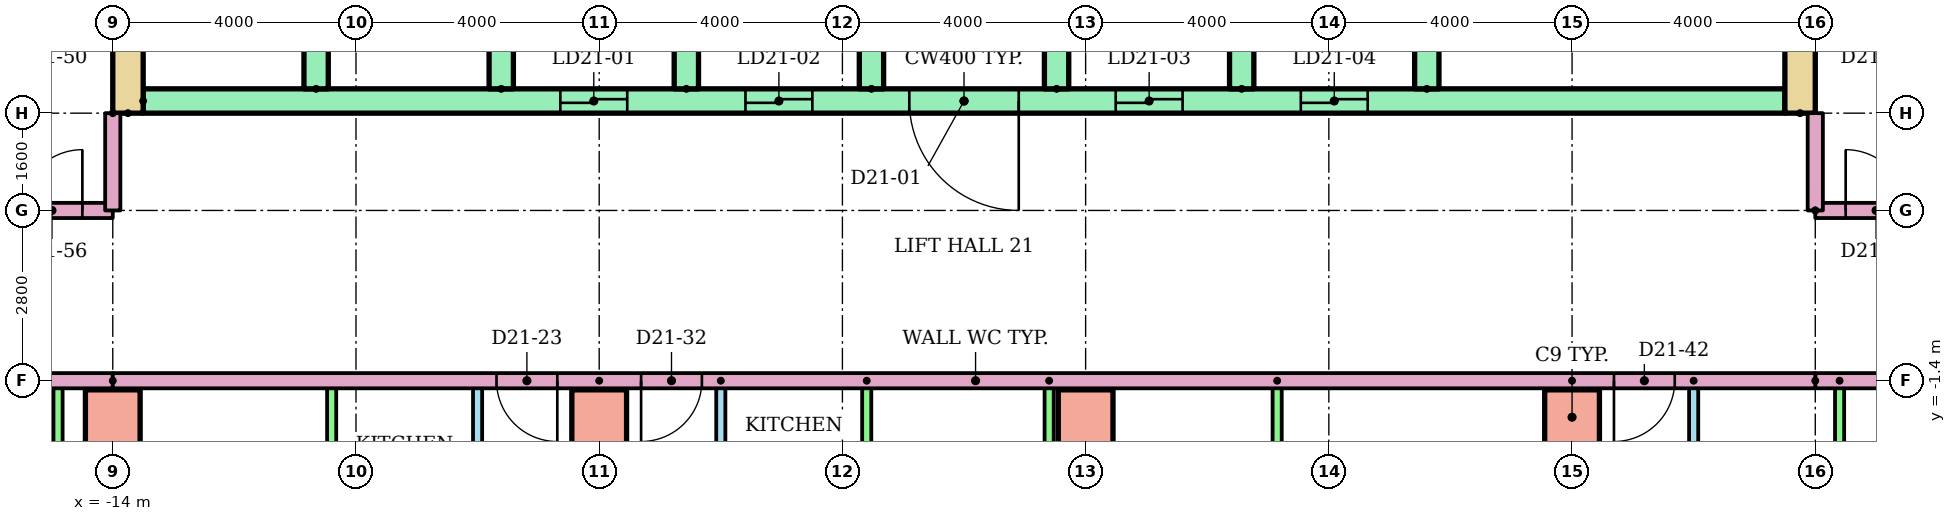
"""IFC4 building model, lengths in metres.
Left out: names, types, materials, properties, quantities, classifications, styles, units other than length and angle.
Written with IfcOpenShell. Run it as: python <this file> out.ifc"""

import sys

from ifc_helpers import new_model, si_unit, direction, frame, frame_2d, origin, origin_2d, place, context, subcontext, project, spatial, rectangle, extrude, element, fill, save


model = new_model("IFC4")
c1 = context("Model", 3, precision=1e-05, world=origin(), true_north=direction((0.0, 1.0)))
c2 = subcontext(c1, "Body", "Model", "MODEL_VIEW")
j1 = project(units=[si_unit("LENGTHUNIT", "METRE"), si_unit("PLANEANGLEUNIT", "RADIAN")], contexts=[c1])
p1 = place(None, origin())
s1 = spatial("IfcSite", under=j1, at=p1, CompositionType="ELEMENT")
p2 = place(p1, origin())
s2 = spatial("IfcBuilding", under=s1, at=p2, CompositionType="ELEMENT")
p3 = place(p2, frame((0.0, 0.0, 83.9)))
s3 = spatial("IfcBuildingStorey", under=s2, at=p3, CompositionType="ELEMENT", Elevation=83.9)
for number, where in (
    (1, (-14.0, -2.0, 0.0)),
    (2, (-6.0, -2.0, 0.0)),
    (3, (2.0, -2.0, 0.0)),
    (4, (10.0, -2.0, 0.0)),
):
    element("IfcColumn", number, at=place(p3, frame(where)), inside=s3, PredefinedType="COLUMN", context=c2, shape_type="SweptSolid", body=[
        extrude(rectangle(XDim=0.9, YDim=0.9, at=origin_2d()), origin(), (0.0, 0.0, 1.0), 3.2),
    ])
for number, where, z_axis, x_axis in (
    (5, (-13.75, 3.0, 0.0), (0.0, 0.0, 1.0), (0.0, 1.0, 0.0)),
    (6, (13.75, 3.0, 0.0), (0.0, 0.0, 1.0), (0.0, 1.0, 0.0)),
):
    element("IfcWall", number, at=place(p3, frame(where, z_axis=z_axis, x_axis=x_axis)), inside=s3, PredefinedType="SHEAR", context=c2, shape_type="SweptSolid", body=[
        extrude(rectangle(XDim=17.0, YDim=0.5, at=frame_2d((8.5, 0.0))), origin(), (0.0, 0.0, 1.0), 2.92),
    ])
p4 = place(p3, frame((-13.5, 3.2, 0.0)))
e7 = element("IfcWall", 7, at=p4, inside=s3, PredefinedType="SHEAR", context=c2, shape_type="SweptSolid", body=[
    extrude(rectangle(XDim=27.0, YDim=0.4, at=frame_2d((13.5, 0.0))), origin(), (0.0, 0.0, 1.0), 2.92),
])
p5 = place(p4, frame((6.861, 0.0, 0.0)))
e8 = element("IfcOpeningElement", 8, at=p5, cuts=e7, PredefinedType="OPENING", context=c2, shape_type="SweptSolid", body=[
    extrude(rectangle(XDim=1.1, YDim=2.1, at=frame_2d((0.55, 1.05))), frame((0.0, 0.21, 0.0), z_axis=(0.0, -1.0, 0.0), x_axis=(1.0, 0.0, 0.0)), (0.0, 0.0, 1.0), 0.42),
])
p6 = place(p4, frame((9.906, 0.0, 0.0)))
e9 = element("IfcOpeningElement", 9, at=p6, cuts=e7, PredefinedType="OPENING", context=c2, shape_type="SweptSolid", body=[
    extrude(rectangle(XDim=1.1, YDim=2.1, at=frame_2d((0.55, 1.05))), frame((0.0, 0.21, 0.0), z_axis=(0.0, -1.0, 0.0), x_axis=(1.0, 0.0, 0.0)), (0.0, 0.0, 1.0), 0.42),
])
p7 = place(p4, frame((15.994, 0.0, 0.0)))
e10 = element("IfcOpeningElement", 10, at=p7, cuts=e7, PredefinedType="OPENING", context=c2, shape_type="SweptSolid", body=[
    extrude(rectangle(XDim=1.1, YDim=2.1, at=frame_2d((0.55, 1.05))), frame((0.0, 0.21, 0.0), z_axis=(0.0, -1.0, 0.0), x_axis=(1.0, 0.0, 0.0)), (0.0, 0.0, 1.0), 0.42),
])
p8 = place(p4, frame((19.039, 0.0, 0.0)))
e11 = element("IfcOpeningElement", 11, at=p8, cuts=e7, PredefinedType="OPENING", context=c2, shape_type="SweptSolid", body=[
    extrude(rectangle(XDim=1.1, YDim=2.1, at=frame_2d((0.55, 1.05))), frame((0.0, 0.21, 0.0), z_axis=(0.0, -1.0, 0.0), x_axis=(1.0, 0.0, 0.0)), (0.0, 0.0, 1.0), 0.42),
])
p9 = place(p4, frame((12.6, 0.0, 0.0)))
e12 = element("IfcOpeningElement", 12, at=p9, cuts=e7, PredefinedType="OPENING", context=c2, shape_type="SweptSolid", body=[
    extrude(rectangle(XDim=1.8, YDim=2.1, at=frame_2d((0.9, 1.05))), frame((0.0, 0.21, 0.0), z_axis=(0.0, -1.0, 0.0), x_axis=(1.0, 0.0, 0.0)), (0.0, 0.0, 1.0), 0.42),
])
for number, where, z_axis, x_axis in (
    (13, (-10.656, 3.4, 0.0), (0.0, 0.0, 1.0), (0.0, 1.0, 0.0)),
    (14, (-7.611, 3.4, 0.0), (0.0, 0.0, 1.0), (0.0, 1.0, 0.0)),
    (15, (-4.567, 3.4, 0.0), (0.0, 0.0, 1.0), (0.0, 1.0, 0.0)),
    (16, (-1.522, 3.4, 0.0), (0.0, 0.0, 1.0), (0.0, 1.0, 0.0)),
    (17, (1.522, 3.4, 0.0), (0.0, 0.0, 1.0), (0.0, 1.0, 0.0)),
    (18, (4.567, 3.4, 0.0), (0.0, 0.0, 1.0), (0.0, 1.0, 0.0)),
    (19, (7.611, 3.4, 0.0), (0.0, 0.0, 1.0), (0.0, 1.0, 0.0)),
):
    element("IfcWall", number, at=place(p3, frame(where, z_axis=z_axis, x_axis=x_axis)), inside=s3, PredefinedType="SHEAR", context=c2, shape_type="SweptSolid", body=[
        extrude(rectangle(XDim=3.0, YDim=0.4, at=frame_2d((1.5, 0.0))), origin(), (0.0, 0.0, 1.0), 2.92),
    ])
p10 = place(p3, frame((-8.0, -7.9, 0.0), z_axis=(0.0, 0.0, 1.0), x_axis=(0.0, 1.0, 0.0)))
e20 = element("IfcWall", 20, at=p10, inside=s3, PredefinedType="PARTITIONING", context=c2, shape_type="SweptSolid", body=[
    extrude(rectangle(XDim=6.5, YDim=0.15, at=frame_2d((3.25, 0.0))), origin(), (0.0, 0.0, 1.0), 2.4),
])
p11 = place(p10, frame((4.3, 0.0, 0.0)))
e21 = element("IfcOpeningElement", 21, at=p11, cuts=e20, PredefinedType="OPENING", context=c2, shape_type="SweptSolid", body=[
    extrude(rectangle(XDim=0.9, YDim=2.1, at=frame_2d((0.45, 1.05))), frame((0.0, 0.085, 0.0), z_axis=(0.0, -1.0, 0.0), x_axis=(1.0, 0.0, 0.0)), (0.0, 0.0, 1.0), 0.17),
])
p12 = place(p10, frame((1.1, 0.0, 0.0)))
e22 = element("IfcOpeningElement", 22, at=p12, cuts=e20, PredefinedType="OPENING", context=c2, shape_type="SweptSolid", body=[
    extrude(rectangle(XDim=0.8, YDim=2.1, at=frame_2d((0.4, 1.05))), frame((0.0, 0.085, 0.0), z_axis=(0.0, -1.0, 0.0), x_axis=(1.0, 0.0, 0.0)), (0.0, 0.0, 1.0), 0.17),
])
for number, where, z_axis, x_axis in (
    (23, (-10.4, -7.9, 0.0), (0.0, 0.0, 1.0), (0.0, 1.0, 0.0)),
    (24, (-14.9, -7.9, 0.0), (0.0, 0.0, 1.0), (0.0, 1.0, 0.0)),
):
    element("IfcWall", number, at=place(p3, frame(where, z_axis=z_axis, x_axis=x_axis)), inside=s3, PredefinedType="PARTITIONING", context=c2, shape_type="SweptSolid", body=[
        extrude(rectangle(XDim=6.5, YDim=0.15, at=frame_2d((3.25, 0.0))), origin(), (0.0, 0.0, 1.0), 2.4),
    ])
p13 = place(p3, frame((-4.0, -1.4, 0.0), z_axis=(0.0, 0.0, 1.0), x_axis=(0.0, -1.0, 0.0)))
e25 = element("IfcWall", 25, at=p13, inside=s3, PredefinedType="PARTITIONING", context=c2, shape_type="SweptSolid", body=[
    extrude(rectangle(XDim=6.5, YDim=0.15, at=frame_2d((3.25, 0.0))), origin(), (0.0, 0.0, 1.0), 2.4),
])
p14 = place(p13, frame((1.3, 0.0, 0.0)))
e26 = element("IfcOpeningElement", 26, at=p14, cuts=e25, PredefinedType="OPENING", context=c2, shape_type="SweptSolid", body=[
    extrude(rectangle(XDim=0.9, YDim=2.1, at=frame_2d((0.45, 1.05))), frame((0.0, 0.085, 0.0), z_axis=(0.0, -1.0, 0.0), x_axis=(1.0, 0.0, 0.0)), (0.0, 0.0, 1.0), 0.17),
])
p15 = place(p13, frame((4.6, 0.0, 0.0)))
e27 = element("IfcOpeningElement", 27, at=p15, cuts=e25, PredefinedType="OPENING", context=c2, shape_type="SweptSolid", body=[
    extrude(rectangle(XDim=0.8, YDim=2.1, at=frame_2d((0.4, 1.05))), frame((0.0, 0.085, 0.0), z_axis=(0.0, -1.0, 0.0), x_axis=(1.0, 0.0, 0.0)), (0.0, 0.0, 1.0), 0.17),
])
for number, where, z_axis, x_axis in (
    (28, (-1.6, -1.4, 0.0), (0.0, 0.0, 1.0), (0.0, -1.0, 0.0)),
    (29, (1.4, -1.4, 0.0), (0.0, 0.0, 1.0), (0.0, -1.0, 0.0)),
    (30, (5.15, -1.4, 0.0), (0.0, 0.0, 1.0), (0.0, -1.0, 0.0)),
):
    element("IfcWall", number, at=place(p3, frame(where, z_axis=z_axis, x_axis=x_axis)), inside=s3, PredefinedType="PARTITIONING", context=c2, shape_type="SweptSolid", body=[
        extrude(rectangle(XDim=6.5, YDim=0.15, at=frame_2d((3.25, 0.0))), origin(), (0.0, 0.0, 1.0), 2.4),
    ])
p16 = place(p3, frame((-6.0, -1.4, 0.0), z_axis=(0.0, 0.0, 1.0), x_axis=(0.0, -1.0, 0.0)))
e31 = element("IfcWall", 31, at=p16, inside=s3, PredefinedType="PARTITIONING", context=c2, shape_type="SweptSolid", body=[
    extrude(rectangle(XDim=14.81, YDim=0.25, at=frame_2d((7.405, 0.0))), origin(), (0.0, 0.0, 1.0), 2.4),
])
p17 = place(p3, frame((12.0, -1.4, 0.0), z_axis=(0.0, 0.0, 1.0), x_axis=(0.0, -1.0, 0.0)))
e32 = element("IfcWall", 32, at=p17, inside=s3, PredefinedType="PARTITIONING", context=c2, shape_type="SweptSolid", body=[
    extrude(rectangle(XDim=6.5, YDim=0.15, at=frame_2d((3.25, 0.0))), origin(), (0.0, 0.0, 1.0), 2.4),
])
p18 = place(p17, frame((1.3, 0.0, 0.0)))
e33 = element("IfcOpeningElement", 33, at=p18, cuts=e32, PredefinedType="OPENING", context=c2, shape_type="SweptSolid", body=[
    extrude(rectangle(XDim=0.9, YDim=2.1, at=frame_2d((0.45, 1.05))), frame((0.0, 0.085, 0.0), z_axis=(0.0, -1.0, 0.0), x_axis=(1.0, 0.0, 0.0)), (0.0, 0.0, 1.0), 0.17),
])
p19 = place(p17, frame((4.6, 0.0, 0.0)))
e34 = element("IfcOpeningElement", 34, at=p19, cuts=e32, PredefinedType="OPENING", context=c2, shape_type="SweptSolid", body=[
    extrude(rectangle(XDim=0.8, YDim=2.1, at=frame_2d((0.4, 1.05))), frame((0.0, 0.085, 0.0), z_axis=(0.0, -1.0, 0.0), x_axis=(1.0, 0.0, 0.0)), (0.0, 0.0, 1.0), 0.17),
])
p20 = place(p3, frame((14.4, -1.4, 0.0), z_axis=(0.0, 0.0, 1.0), x_axis=(0.0, -1.0, 0.0)))
e35 = element("IfcWall", 35, at=p20, inside=s3, PredefinedType="PARTITIONING", context=c2, shape_type="SweptSolid", body=[
    extrude(rectangle(XDim=6.5, YDim=0.15, at=frame_2d((3.25, 0.0))), origin(), (0.0, 0.0, 1.0), 2.4),
])
p21 = place(p3, frame((10.0, -1.4, 0.0), z_axis=(0.0, 0.0, 1.0), x_axis=(0.0, -1.0, 0.0)))
e36 = element("IfcWall", 36, at=p21, inside=s3, PredefinedType="PARTITIONING", context=c2, shape_type="SweptSolid", body=[
    extrude(rectangle(XDim=14.81, YDim=0.25, at=frame_2d((7.405, 0.0))), origin(), (0.0, 0.0, 1.0), 2.4),
])
p22 = place(p3, frame((-14.0, -1.4, 0.0), z_axis=(0.0, 0.0, 1.0), x_axis=(-1.0, 0.0, 0.0)))
e37 = element("IfcWall", 37, at=p22, inside=s3, PredefinedType="PARTITIONING", context=c2, shape_type="SweptSolid", body=[
    extrude(rectangle(XDim=14.62, YDim=0.25, at=frame_2d((7.31, 0.0))), origin(), (0.0, 0.0, 1.0), 2.4),
])
p23 = place(p3, frame((29.0, -1.4, 0.0), z_axis=(0.0, 0.0, 1.0), x_axis=(-1.0, 0.0, 0.0)))
e38 = element("IfcWall", 38, at=p23, inside=s3, PredefinedType="PARTITIONING", context=c2, shape_type="SweptSolid", body=[
    extrude(rectangle(XDim=15.0, YDim=0.25, at=frame_2d((7.5, 0.0))), origin(), (0.0, 0.0, 1.0), 2.4),
])
p24 = place(p23, frame((1.311, 0.0, 0.0)))
e39 = element("IfcOpeningElement", 39, at=p24, cuts=e38, PredefinedType="OPENING", context=c2, shape_type="SweptSolid", body=[
    extrude(rectangle(XDim=1.0, YDim=2.1, at=frame_2d((0.5, 1.05))), frame((0.0, 0.135, 0.0), z_axis=(0.0, -1.0, 0.0), x_axis=(1.0, 0.0, 0.0)), (0.0, 0.0, 1.0), 0.27),
])
p25 = place(p3, frame((-28.62, 1.4, 0.0)))
e40 = element("IfcWall", 40, at=p25, inside=s3, PredefinedType="PARTITIONING", context=c2, shape_type="SweptSolid", body=[
    extrude(rectangle(XDim=14.62, YDim=0.25, at=frame_2d((7.31, 0.0))), origin(), (0.0, 0.0, 1.0), 2.4),
])
p26 = place(p25, frame((13.12, 0.0, 0.0)))
e41 = element("IfcOpeningElement", 41, at=p26, cuts=e40, PredefinedType="OPENING", context=c2, shape_type="SweptSolid", body=[
    extrude(rectangle(XDim=1.0, YDim=2.1, at=frame_2d((0.5, 1.05))), frame((0.0, 0.135, 0.0), z_axis=(0.0, -1.0, 0.0), x_axis=(1.0, 0.0, 0.0)), (0.0, 0.0, 1.0), 0.27),
])
p27 = place(p3, frame((14.0, 1.4, 0.0)))
e42 = element("IfcWall", 42, at=p27, inside=s3, PredefinedType="PARTITIONING", context=c2, shape_type="SweptSolid", body=[
    extrude(rectangle(XDim=15.0, YDim=0.25, at=frame_2d((7.5, 0.0))), origin(), (0.0, 0.0, 1.0), 2.4),
])
p28 = place(p27, frame((0.5, 0.0, 0.0)))
e43 = element("IfcOpeningElement", 43, at=p28, cuts=e42, PredefinedType="OPENING", context=c2, shape_type="SweptSolid", body=[
    extrude(rectangle(XDim=1.0, YDim=2.1, at=frame_2d((0.5, 1.05))), frame((0.0, 0.135, 0.0), z_axis=(0.0, -1.0, 0.0), x_axis=(1.0, 0.0, 0.0)), (0.0, 0.0, 1.0), 0.27),
])
p29 = place(p27, frame((12.689, 0.0, 0.0)))
e44 = element("IfcOpeningElement", 44, at=p29, cuts=e42, PredefinedType="OPENING", context=c2, shape_type="SweptSolid", body=[
    extrude(rectangle(XDim=1.0, YDim=2.1, at=frame_2d((0.5, 1.05))), frame((0.0, 0.135, 0.0), z_axis=(0.0, -1.0, 0.0), x_axis=(1.0, 0.0, 0.0)), (0.0, 0.0, 1.0), 0.27),
])
p30 = place(p3, frame((14.0, -1.4, 0.0), z_axis=(0.0, 0.0, 1.0), x_axis=(-1.0, 0.0, 0.0)))
e45 = element("IfcWall", 45, at=p30, inside=s3, PredefinedType="PARTITIONING", context=c2, shape_type="SweptSolid", body=[
    extrude(rectangle(XDim=28.0, YDim=0.25, at=frame_2d((14.0, 0.0))), origin(), (0.0, 0.0, 1.0), 2.4),
])
p31 = place(p30, frame((20.689, 0.0, 0.0)))
e46 = element("IfcOpeningElement", 46, at=p31, cuts=e45, PredefinedType="OPENING", context=c2, shape_type="SweptSolid", body=[
    extrude(rectangle(XDim=1.0, YDim=2.1, at=frame_2d((0.5, 1.05))), frame((0.0, 0.135, 0.0), z_axis=(0.0, -1.0, 0.0), x_axis=(1.0, 0.0, 0.0)), (0.0, 0.0, 1.0), 0.27),
])
p32 = place(p30, frame((18.311, 0.0, 0.0)))
e47 = element("IfcOpeningElement", 47, at=p32, cuts=e45, PredefinedType="OPENING", context=c2, shape_type="SweptSolid", body=[
    extrude(rectangle(XDim=1.0, YDim=2.1, at=frame_2d((0.5, 1.05))), frame((0.0, 0.135, 0.0), z_axis=(0.0, -1.0, 0.0), x_axis=(1.0, 0.0, 0.0)), (0.0, 0.0, 1.0), 0.27),
])
p33 = place(p30, frame((2.311, 0.0, 0.0)))
e48 = element("IfcOpeningElement", 48, at=p33, cuts=e45, PredefinedType="OPENING", context=c2, shape_type="SweptSolid", body=[
    extrude(rectangle(XDim=1.0, YDim=2.1, at=frame_2d((0.5, 1.05))), frame((0.0, 0.135, 0.0), z_axis=(0.0, -1.0, 0.0), x_axis=(1.0, 0.0, 0.0)), (0.0, 0.0, 1.0), 0.27),
])
for number, where, z_axis, x_axis in (
    (49, (-14.0, 3.0, 0.0), (0.0, 0.0, 1.0), (0.0, -1.0, 0.0)),
    (50, (14.0, 1.4, 0.0), (0.0, 0.0, 1.0), (0.0, 1.0, 0.0)),
):
    element("IfcWall", number, at=place(p3, frame(where, z_axis=z_axis, x_axis=x_axis)), inside=s3, PredefinedType="PARTITIONING", context=c2, shape_type="SweptSolid", body=[
        extrude(rectangle(XDim=1.6, YDim=0.25, at=frame_2d((0.8, 0.0))), origin(), (0.0, 0.0, 1.0), 2.4),
    ])
p34 = place(p5, origin())
e51 = element("IfcDoor", 51, at=p34, inside=s3, OperationType="SLIDING_TO_LEFT", PredefinedType="DOOR", context=c2, shape_type="SweptSolid", body=[
    extrude(rectangle(XDim=1.1, YDim=2.1, at=frame_2d((0.55, 1.05))), frame((0.0, 0.025, 0.0), z_axis=(0.0, -1.0, 0.0), x_axis=(1.0, 0.0, 0.0)), (0.0, 0.0, 1.0), 0.05),
])
fill(e8, e51)
p35 = place(p6, origin())
e52 = element("IfcDoor", 52, at=p35, inside=s3, OperationType="SLIDING_TO_LEFT", PredefinedType="DOOR", context=c2, shape_type="SweptSolid", body=[
    extrude(rectangle(XDim=1.1, YDim=2.1, at=frame_2d((0.55, 1.05))), frame((0.0, 0.025, 0.0), z_axis=(0.0, -1.0, 0.0), x_axis=(1.0, 0.0, 0.0)), (0.0, 0.0, 1.0), 0.05),
])
fill(e9, e52)
p36 = place(p7, origin())
e53 = element("IfcDoor", 53, at=p36, inside=s3, OperationType="SLIDING_TO_LEFT", PredefinedType="DOOR", context=c2, shape_type="SweptSolid", body=[
    extrude(rectangle(XDim=1.1, YDim=2.1, at=frame_2d((0.55, 1.05))), frame((0.0, 0.025, 0.0), z_axis=(0.0, -1.0, 0.0), x_axis=(1.0, 0.0, 0.0)), (0.0, 0.0, 1.0), 0.05),
])
fill(e10, e53)
p37 = place(p8, origin())
e54 = element("IfcDoor", 54, at=p37, inside=s3, OperationType="SLIDING_TO_LEFT", PredefinedType="DOOR", context=c2, shape_type="SweptSolid", body=[
    extrude(rectangle(XDim=1.1, YDim=2.1, at=frame_2d((0.55, 1.05))), frame((0.0, 0.025, 0.0), z_axis=(0.0, -1.0, 0.0), x_axis=(1.0, 0.0, 0.0)), (0.0, 0.0, 1.0), 0.05),
])
fill(e11, e54)
p38 = place(p9, frame((1.8, 0.0, 0.0), z_axis=(0.0, 0.0, 1.0), x_axis=(-1.0, 0.0, 0.0)))
e55 = element("IfcDoor", 55, at=p38, inside=s3, OperationType="DOUBLE_DOOR_SINGLE_SWING", PredefinedType="DOOR", context=c2, shape_type="SweptSolid", body=[
    extrude(rectangle(XDim=1.8, YDim=2.1, at=frame_2d((0.9, 1.05))), frame((0.0, 0.025, 0.0), z_axis=(0.0, -1.0, 0.0), x_axis=(1.0, 0.0, 0.0)), (0.0, 0.0, 1.0), 0.05),
])
fill(e12, e55)
p39 = place(p31, origin())
e56 = element("IfcDoor", 56, at=p39, inside=s3, OperationType="SINGLE_SWING_LEFT", PredefinedType="DOOR", context=c2, shape_type="SweptSolid", body=[
    extrude(rectangle(XDim=1.0, YDim=2.1, at=frame_2d((0.5, 1.05))), frame((0.0, 0.025, 0.0), z_axis=(0.0, -1.0, 0.0), x_axis=(1.0, 0.0, 0.0)), (0.0, 0.0, 1.0), 0.05),
])
fill(e46, e56)
p40 = place(p32, origin())
e57 = element("IfcDoor", 57, at=p40, inside=s3, OperationType="SINGLE_SWING_RIGHT", PredefinedType="DOOR", context=c2, shape_type="SweptSolid", body=[
    extrude(rectangle(XDim=1.0, YDim=2.1, at=frame_2d((0.5, 1.05))), frame((0.0, 0.025, 0.0), z_axis=(0.0, -1.0, 0.0), x_axis=(1.0, 0.0, 0.0)), (0.0, 0.0, 1.0), 0.05),
])
fill(e47, e57)
p41 = place(p33, origin())
e58 = element("IfcDoor", 58, at=p41, inside=s3, OperationType="SINGLE_SWING_RIGHT", PredefinedType="DOOR", context=c2, shape_type="SweptSolid", body=[
    extrude(rectangle(XDim=1.0, YDim=2.1, at=frame_2d((0.5, 1.05))), frame((0.0, 0.025, 0.0), z_axis=(0.0, -1.0, 0.0), x_axis=(1.0, 0.0, 0.0)), (0.0, 0.0, 1.0), 0.05),
])
fill(e48, e58)
p42 = place(p26, origin())
e59 = element("IfcDoor", 59, at=p42, inside=s3, OperationType="SINGLE_SWING_RIGHT", PredefinedType="DOOR", context=c2, shape_type="SweptSolid", body=[
    extrude(rectangle(XDim=1.0, YDim=2.1, at=frame_2d((0.5, 1.05))), frame((0.0, 0.025, 0.0), z_axis=(0.0, -1.0, 0.0), x_axis=(1.0, 0.0, 0.0)), (0.0, 0.0, 1.0), 0.05),
])
fill(e41, e59)
p43 = place(p28, origin())
e60 = element("IfcDoor", 60, at=p43, inside=s3, OperationType="SINGLE_SWING_LEFT", PredefinedType="DOOR", context=c2, shape_type="SweptSolid", body=[
    extrude(rectangle(XDim=1.0, YDim=2.1, at=frame_2d((0.5, 1.05))), frame((0.0, 0.025, 0.0), z_axis=(0.0, -1.0, 0.0), x_axis=(1.0, 0.0, 0.0)), (0.0, 0.0, 1.0), 0.05),
])
fill(e43, e60)
save(model, sys.argv[1])
